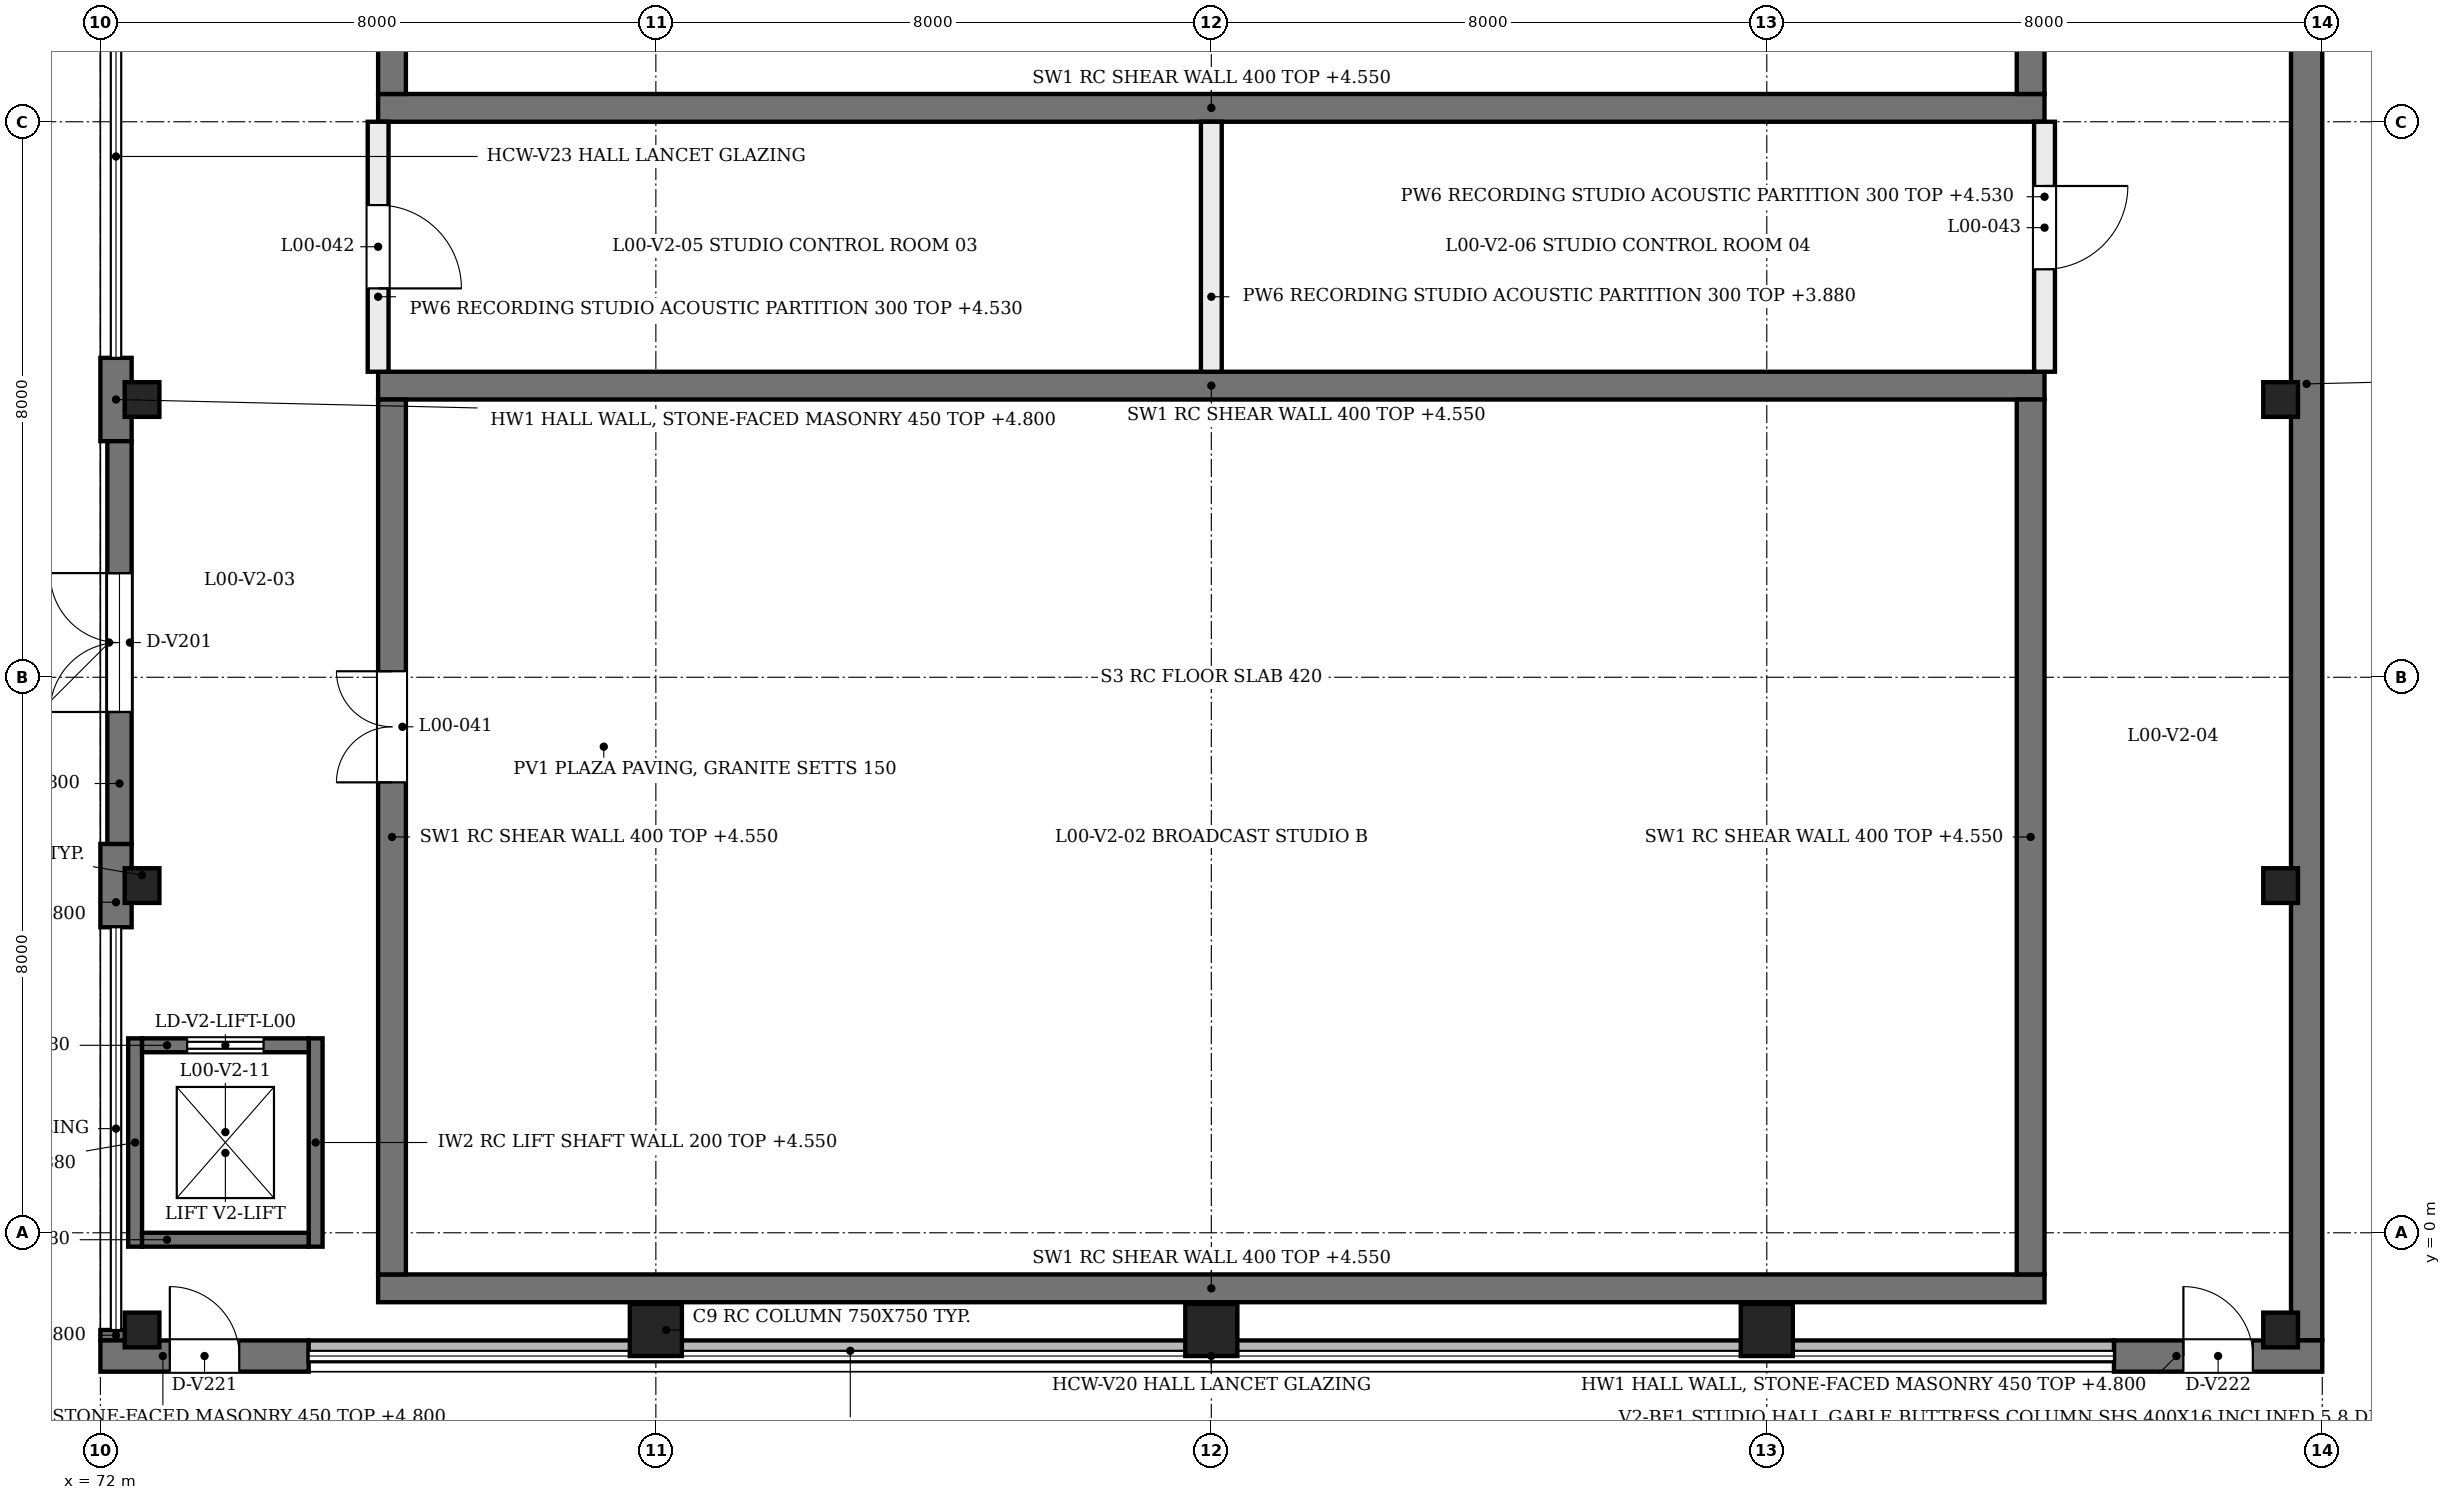
"""IFC4 building model, lengths in metres.
Left out: names, types, materials, properties, quantities, classifications, styles, units other than length and angle.
Written with IfcOpenShell. Run it as: python <this file> out.ifc"""

import sys

from ifc_helpers import new_model, si_unit, direction, frame, frame_2d, origin, origin_2d, place, context, subcontext, project, spatial, rectangle, extrude, element, fill, save


model = new_model("IFC4")
c1 = context("Model", 3, precision=1e-05, world=origin(), true_north=direction((0.0, 1.0)))
c2 = subcontext(c1, "Body", "Model", "MODEL_VIEW")
j1 = project(units=[si_unit("LENGTHUNIT", "METRE"), si_unit("PLANEANGLEUNIT", "RADIAN")], contexts=[c1])
p1 = place(None, origin())
s1 = spatial("IfcSite", under=j1, at=p1, CompositionType="ELEMENT")
p2 = place(p1, origin())
s2 = spatial("IfcBuilding", under=s1, at=p2, CompositionType="ELEMENT")
p3 = place(p2, origin())
s3 = spatial("IfcBuildingStorey", under=s2, at=p3, CompositionType="ELEMENT", Elevation=0.0)
p4 = place(p3, frame((76.0, 16.2, 0.0), z_axis=(0.0, 0.0, 1.0), x_axis=(1.0, 0.0, 0.0)))
e1 = element("IfcWall", 1, at=p4, inside=s3, PredefinedType="SHEAR", context=c2, shape_type="SweptSolid", body=[
    extrude(rectangle(XDim=24.0, YDim=0.4, at=frame_2d((12.0, 0.0))), origin(), (0.0, 0.0, 1.0), 4.55),
])
p5 = place(p3, frame((76.2, 16.4, 0.0), z_axis=(0.0, 0.0, 1.0), x_axis=(0.0, 1.0, 0.0)))
e2 = element("IfcWall", 2, at=p5, inside=s3, PredefinedType="SHEAR", context=c2, shape_type="SweptSolid", body=[
    extrude(rectangle(XDim=22.6, YDim=0.4, at=frame_2d((11.3, 0.0))), origin(), (0.0, 0.0, 1.0), 4.55),
])
p6 = place(p3, frame((99.8, 16.4, 0.0), z_axis=(0.0, 0.0, 1.0), x_axis=(0.0, 1.0, 0.0)))
e3 = element("IfcWall", 3, at=p6, inside=s3, PredefinedType="SHEAR", context=c2, shape_type="SweptSolid", body=[
    extrude(rectangle(XDim=22.6, YDim=0.4, at=frame_2d((11.3, 0.0))), origin(), (0.0, 0.0, 1.0), 4.55),
])
p7 = place(p6, frame((7.413, 0.0, 0.0)))
e4 = element("IfcOpeningElement", 4, at=p7, cuts=e3, PredefinedType="OPENING", context=c2, shape_type="SweptSolid", body=[
    extrude(rectangle(XDim=1.8, YDim=2.4, at=frame_2d((0.9, 1.2))), frame((0.0, 0.21, 0.0), z_axis=(0.0, -1.0, 0.0), x_axis=(1.0, 0.0, 0.0)), (0.0, 0.0, 1.0), 0.42),
])
for number, where, z_axis, x_axis in (
    (5, (76.0, -0.8, 0.0), (0.0, 0.0, 1.0), (1.0, 0.0, 0.0)),
    (6, (76.0, 12.2, 0.0), (0.0, 0.0, 1.0), (1.0, 0.0, 0.0)),
):
    element("IfcWall", number, at=place(p3, frame(where, z_axis=z_axis, x_axis=x_axis)), inside=s3, PredefinedType="SHEAR", context=c2, shape_type="SweptSolid", body=[
        extrude(rectangle(XDim=24.0, YDim=0.4, at=frame_2d((12.0, 0.0))), origin(), (0.0, 0.0, 1.0), 4.55),
    ])
p8 = place(p3, frame((76.2, -0.6, 0.0), z_axis=(0.0, 0.0, 1.0), x_axis=(0.0, 1.0, 0.0)))
e7 = element("IfcWall", 7, at=p8, inside=s3, PredefinedType="SHEAR", context=c2, shape_type="SweptSolid", body=[
    extrude(rectangle(XDim=12.6, YDim=0.4, at=frame_2d((6.3, 0.0))), origin(), (0.0, 0.0, 1.0), 4.55),
])
p9 = place(p8, frame((7.087, 0.0, 0.0)))
e8 = element("IfcOpeningElement", 8, at=p9, cuts=e7, PredefinedType="OPENING", context=c2, shape_type="SweptSolid", body=[
    extrude(rectangle(XDim=1.6, YDim=2.4, at=frame_2d((0.8, 1.2))), frame((0.0, 0.21, 0.0), z_axis=(0.0, -1.0, 0.0), x_axis=(1.0, 0.0, 0.0)), (0.0, 0.0, 1.0), 0.42),
])
p10 = place(p3, frame((99.8, -0.6, 0.0), z_axis=(0.0, 0.0, 1.0), x_axis=(0.0, 1.0, 0.0)))
e9 = element("IfcWall", 9, at=p10, inside=s3, PredefinedType="SHEAR", context=c2, shape_type="SweptSolid", body=[
    extrude(rectangle(XDim=12.6, YDim=0.4, at=frame_2d((6.3, 0.0))), origin(), (0.0, 0.0, 1.0), 4.55),
])
for number, where, z_axis, x_axis in (
    (10, (72.6, -1.4, 0.0), (0.0, 0.0, 1.0), (1.0, 0.0, 0.0)),
    (11, (72.6, 5.0, 0.0), (0.0, 0.0, 1.0), (1.0, 0.0, 0.0)),
    (12, (72.6, 12.0, 0.0), (0.0, 0.0, 1.0), (1.0, 0.0, 0.0)),
):
    element("IfcColumn", number, at=place(p3, frame(where, z_axis=z_axis, x_axis=x_axis)), inside=s3, PredefinedType="COLUMN", context=c2, shape_type="SweptSolid", body=[
        extrude(rectangle(XDim=0.5, YDim=0.5, at=origin_2d()), origin(), (0.0, 0.0, 1.0), 4.8),
    ])
for number, where, z_axis, x_axis in (
    (13, (80.0, -1.4, 0.0), (0.0, 0.0, 1.0), (1.0, 0.0, 0.0)),
    (14, (88.0, -1.4, 0.0), (0.0, 0.0, 1.0), (1.0, 0.0, 0.0)),
    (15, (96.0, -1.4, 0.0), (0.0, 0.0, 1.0), (1.0, 0.0, 0.0)),
):
    element("IfcColumn", number, at=place(p3, frame(where, z_axis=z_axis, x_axis=x_axis)), inside=s3, PredefinedType="COLUMN", context=c2, shape_type="SweptSolid", body=[
        extrude(rectangle(XDim=0.75, YDim=0.75, at=origin_2d()), origin(), (0.0, 0.0, 1.0), 4.8),
    ])
for number, where, z_axis, x_axis in (
    (16, (103.4, -1.4, 0.0), (0.0, 0.0, 1.0), (1.0, 0.0, 0.0)),
    (17, (103.4, 5.0, 0.0), (0.0, 0.0, 1.0), (1.0, 0.0, 0.0)),
    (18, (103.4, 12.0, 0.0), (0.0, 0.0, 1.0), (1.0, 0.0, 0.0)),
):
    element("IfcColumn", number, at=place(p3, frame(where, z_axis=z_axis, x_axis=x_axis)), inside=s3, PredefinedType="COLUMN", context=c2, shape_type="SweptSolid", body=[
        extrude(rectangle(XDim=0.5, YDim=0.5, at=origin_2d()), origin(), (0.0, 0.0, 1.0), 4.8),
    ])
p11 = place(p3, frame((72.225, -1.55, 0.0), z_axis=(0.0, 0.0, 1.0), x_axis=(0.0, 1.0, 0.0)))
e19 = element("IfcWall", 19, at=p11, inside=s3, PredefinedType="SOLIDWALL", context=c2, shape_type="SweptSolid", body=[
    extrude(rectangle(XDim=0.15, YDim=0.45, at=frame_2d((0.075, 0.0))), origin(), (0.0, 0.0, 1.0), 4.8),
])
for number, where, z_axis, x_axis in (
    (20, (72.225, 4.4, 0.0), (0.0, 0.0, 1.0), (0.0, 1.0, 0.0)),
    (21, (72.225, 11.4, 0.0), (0.0, 0.0, 1.0), (0.0, 1.0, 0.0)),
):
    element("IfcWall", number, at=place(p3, frame(where, z_axis=z_axis, x_axis=x_axis)), inside=s3, PredefinedType="SOLIDWALL", context=c2, shape_type="SweptSolid", body=[
        extrude(rectangle(XDim=1.2, YDim=0.45, at=frame_2d((0.6, 0.0))), origin(), (0.0, 0.0, 1.0), 4.8),
    ])
p12 = place(p3, frame((72.275, 5.6, 0.0), z_axis=(0.0, 0.0, 1.0), x_axis=(0.0, 1.0, 0.0)))
e22 = element("IfcWall", 22, at=p12, inside=s3, PredefinedType="SOLIDWALL", context=c2, shape_type="SweptSolid", body=[
    extrude(rectangle(XDim=5.8, YDim=0.35, at=frame_2d((2.9, 0.0))), origin(), (0.0, 0.0, 1.0), 4.8),
])
p13 = place(p12, frame((1.9, 0.0, 0.0)))
e23 = element("IfcOpeningElement", 23, at=p13, cuts=e22, PredefinedType="OPENING", context=c2, shape_type="SweptSolid", body=[
    extrude(rectangle(XDim=2.0, YDim=2.7, at=frame_2d((1.0, 1.35))), frame((0.0, 0.185, 0.0), z_axis=(0.0, -1.0, 0.0), x_axis=(1.0, 0.0, 0.0)), (0.0, 0.0, 1.0), 0.37),
])
p14 = place(p12, frame((1.9, 0.0, 3.0)))
e24 = element("IfcOpeningElement", 24, at=p14, cuts=e22, PredefinedType="OPENING", context=c2, shape_type="SweptSolid", body=[
    extrude(rectangle(XDim=2.0, YDim=1.5, at=frame_2d((1.0, 0.75))), frame((0.0, 0.185, 0.0), z_axis=(0.0, -1.0, 0.0), x_axis=(1.0, 0.0, 0.0)), (0.0, 0.0, 1.0), 0.37),
])
p15 = place(p3, frame((103.775, -1.55, 0.0), z_axis=(0.0, 0.0, 1.0), x_axis=(0.0, 1.0, 0.0)))
e25 = element("IfcWall", 25, at=p15, inside=s3, PredefinedType="SOLIDWALL", context=c2, shape_type="SweptSolid", body=[
    extrude(rectangle(XDim=41.1, YDim=0.45, at=frame_2d((20.55, 0.0))), origin(), (0.0, 0.0, 1.0), 4.8),
])
p16 = place(p15, frame((35.1, 0.0, 0.0)))
e26 = element("IfcOpeningElement", 26, at=p16, cuts=e25, PredefinedType="OPENING", context=c2, shape_type="SweptSolid", body=[
    extrude(rectangle(XDim=1.0, YDim=2.1, at=frame_2d((0.5, 1.05))), frame((0.0, 0.235, 0.0), z_axis=(0.0, -1.0, 0.0), x_axis=(1.0, 0.0, 0.0)), (0.0, 0.0, 1.0), 0.47),
])
p17 = place(p3, frame((72.0, -1.775, 0.0), z_axis=(0.0, 0.0, 1.0), x_axis=(1.0, 0.0, 0.0)))
e27 = element("IfcWall", 27, at=p17, inside=s3, PredefinedType="SOLIDWALL", context=c2, shape_type="SweptSolid", body=[
    extrude(rectangle(XDim=3.0, YDim=0.45, at=frame_2d((1.5, 0.0))), origin(), (0.0, 0.0, 1.0), 4.8),
])
p18 = place(p17, frame((1.0, 0.0, 0.0)))
e28 = element("IfcOpeningElement", 28, at=p18, cuts=e27, PredefinedType="OPENING", context=c2, shape_type="SweptSolid", body=[
    extrude(rectangle(XDim=1.0, YDim=2.4, at=frame_2d((0.5, 1.2))), frame((0.0, 0.235, 0.0), z_axis=(0.0, -1.0, 0.0), x_axis=(1.0, 0.0, 0.0)), (0.0, 0.0, 1.0), 0.47),
])
p19 = place(p3, frame((101.0, -1.775, 0.0), z_axis=(0.0, 0.0, 1.0), x_axis=(1.0, 0.0, 0.0)))
e29 = element("IfcWall", 29, at=p19, inside=s3, PredefinedType="SOLIDWALL", context=c2, shape_type="SweptSolid", body=[
    extrude(rectangle(XDim=3.0, YDim=0.45, at=frame_2d((1.5, 0.0))), origin(), (0.0, 0.0, 1.0), 4.8),
])
p20 = place(p19, frame((1.0, 0.0, 0.0)))
e30 = element("IfcOpeningElement", 30, at=p20, cuts=e29, PredefinedType="OPENING", context=c2, shape_type="SweptSolid", body=[
    extrude(rectangle(XDim=1.0, YDim=2.4, at=frame_2d((0.5, 1.2))), frame((0.0, 0.235, 0.0), z_axis=(0.0, -1.0, 0.0), x_axis=(1.0, 0.0, 0.0)), (0.0, 0.0, 1.0), 0.47),
])
p21 = place(p3, frame((75.0, -1.7, 0.0), z_axis=(0.0, 0.0, 1.0), x_axis=(1.0, 0.0, 0.0)))
e31 = element("IfcWall", 31, at=p21, inside=s3, PredefinedType="SOLIDWALL", context=c2, shape_type="SweptSolid", body=[
    extrude(rectangle(XDim=26.0, YDim=0.3, at=frame_2d((13.0, 0.0))), origin(), (0.0, 0.0, 1.0), 1.2),
])
p22 = place(p3, frame((72.5, -0.2, 0.0), z_axis=(0.0, 0.0, 1.0), x_axis=(0.0, 1.0, 0.0)))
e32 = element("IfcWall", 32, at=p22, inside=s3, PredefinedType="SOLIDWALL", context=c2, shape_type="SweptSolid", body=[
    extrude(rectangle(XDim=3.0, YDim=0.2, at=frame_2d((1.5, 0.0))), origin(), (0.0, 0.0, 1.0), 3.88),
])
p23 = place(p3, frame((75.1, -0.2, 0.0), z_axis=(0.0, 0.0, 1.0), x_axis=(0.0, 1.0, 0.0)))
e33 = element("IfcWall", 33, at=p23, inside=s3, PredefinedType="SOLIDWALL", context=c2, shape_type="SweptSolid", body=[
    extrude(rectangle(XDim=3.0, YDim=0.2, at=frame_2d((1.5, 0.0))), origin(), (0.0, 0.0, 1.0), 4.55),
])
p24 = place(p3, frame((72.6, -0.1, 0.0), z_axis=(0.0, 0.0, 1.0), x_axis=(1.0, 0.0, 0.0)))
e34 = element("IfcWall", 34, at=p24, inside=s3, PredefinedType="SOLIDWALL", context=c2, shape_type="SweptSolid", body=[
    extrude(rectangle(XDim=2.4, YDim=0.2, at=frame_2d((1.2, 0.0))), origin(), (0.0, 0.0, 1.0), 3.88),
])
p25 = place(p3, frame((72.6, 2.7, 0.0), z_axis=(0.0, 0.0, 1.0), x_axis=(1.0, 0.0, 0.0)))
e35 = element("IfcWall", 35, at=p25, inside=s3, PredefinedType="SOLIDWALL", context=c2, shape_type="SweptSolid", body=[
    extrude(rectangle(XDim=2.4, YDim=0.2, at=frame_2d((1.2, 0.0))), origin(), (0.0, 0.0, 1.0), 3.88),
])
p26 = place(p25, frame((0.65, 0.0, 0.0)))
e36 = element("IfcOpeningElement", 36, at=p26, cuts=e35, PredefinedType="OPENING", context=c2, shape_type="SweptSolid", body=[
    extrude(rectangle(XDim=1.1, YDim=2.1, at=frame_2d((0.55, 1.05))), frame((0.0, 0.11, 0.0), z_axis=(0.0, -1.0, 0.0), x_axis=(1.0, 0.0, 0.0)), (0.0, 0.0, 1.0), 0.22),
])
p27 = place(p3, frame((76.0, 12.4, 0.0), z_axis=(0.0, 0.0, 1.0), x_axis=(0.0, 1.0, 0.0)))
e37 = element("IfcWall", 37, at=p27, inside=s3, PredefinedType="PARTITIONING", context=c2, shape_type="SweptSolid", body=[
    extrude(rectangle(XDim=3.6, YDim=0.3, at=frame_2d((1.8, 0.0))), origin(), (0.0, 0.0, 1.0), 4.53),
])
p28 = place(p27, frame((1.2, 0.0, 0.0)))
e38 = element("IfcOpeningElement", 38, at=p28, cuts=e37, PredefinedType="OPENING", context=c2, shape_type="SweptSolid", body=[
    extrude(rectangle(XDim=1.2, YDim=2.2, at=frame_2d((0.6, 1.1))), frame((0.0, 0.16, 0.0), z_axis=(0.0, -1.0, 0.0), x_axis=(1.0, 0.0, 0.0)), (0.0, 0.0, 1.0), 0.32),
])
p29 = place(p3, frame((100.0, 12.4, 0.0), z_axis=(0.0, 0.0, 1.0), x_axis=(0.0, 1.0, 0.0)))
e39 = element("IfcWall", 39, at=p29, inside=s3, PredefinedType="PARTITIONING", context=c2, shape_type="SweptSolid", body=[
    extrude(rectangle(XDim=3.6, YDim=0.3, at=frame_2d((1.8, 0.0))), origin(), (0.0, 0.0, 1.0), 4.53),
])
p30 = place(p29, frame((1.475, 0.0, 0.0)))
e40 = element("IfcOpeningElement", 40, at=p30, cuts=e39, PredefinedType="OPENING", context=c2, shape_type="SweptSolid", body=[
    extrude(rectangle(XDim=1.2, YDim=2.2, at=frame_2d((0.6, 1.1))), frame((0.0, 0.16, 0.0), z_axis=(0.0, -1.0, 0.0), x_axis=(1.0, 0.0, 0.0)), (0.0, 0.0, 1.0), 0.32),
])
p31 = place(p3, frame((88.0, 12.4, 0.0), z_axis=(0.0, 0.0, 1.0), x_axis=(0.0, 1.0, 0.0)))
e41 = element("IfcWall", 41, at=p31, inside=s3, PredefinedType="PARTITIONING", context=c2, shape_type="SweptSolid", body=[
    extrude(rectangle(XDim=3.6, YDim=0.3, at=frame_2d((1.8, 0.0))), origin(), (0.0, 0.0, 1.0), 3.88),
])
p32 = place(p13, origin())
e42 = element("IfcDoor", 42, at=p32, inside=s3, OperationType="SINGLE_SWING_LEFT", PredefinedType="DOOR", context=c2, shape_type="SweptSolid", body=[
    extrude(rectangle(XDim=2.0, YDim=2.7, at=frame_2d((1.0, 1.35))), frame((0.0, 0.025, 0.0), z_axis=(0.0, -1.0, 0.0), x_axis=(1.0, 0.0, 0.0)), (0.0, 0.0, 1.0), 0.05),
])
fill(e23, e42)
p33 = place(p14, origin())
e43 = element("IfcWindow", 43, at=p33, inside=s3, PartitioningType="SINGLE_PANEL", PredefinedType="WINDOW", context=c2, shape_type="SweptSolid", body=[
    extrude(rectangle(XDim=2.0, YDim=1.5, at=frame_2d((1.0, 0.75))), frame((0.0, 0.03, 0.0), z_axis=(0.0, -1.0, 0.0), x_axis=(1.0, 0.0, 0.0)), (0.0, 0.0, 1.0), 0.06),
])
fill(e24, e43)
p34 = place(p18, origin())
e44 = element("IfcDoor", 44, at=p34, inside=s3, OperationType="SINGLE_SWING_LEFT", PredefinedType="DOOR", context=c2, shape_type="SweptSolid", body=[
    extrude(rectangle(XDim=1.0, YDim=2.4, at=frame_2d((0.5, 1.2))), frame((0.0, 0.025, 0.0), z_axis=(0.0, -1.0, 0.0), x_axis=(1.0, 0.0, 0.0)), (0.0, 0.0, 1.0), 0.05),
])
fill(e28, e44)
p35 = place(p20, origin())
e45 = element("IfcDoor", 45, at=p35, inside=s3, OperationType="SINGLE_SWING_LEFT", PredefinedType="DOOR", context=c2, shape_type="SweptSolid", body=[
    extrude(rectangle(XDim=1.0, YDim=2.4, at=frame_2d((0.5, 1.2))), frame((0.0, 0.025, 0.0), z_axis=(0.0, -1.0, 0.0), x_axis=(1.0, 0.0, 0.0)), (0.0, 0.0, 1.0), 0.05),
])
fill(e30, e45)
p36 = place(p26, origin())
e46 = element("IfcDoor", 46, at=p36, inside=s3, OperationType="DOUBLE_DOOR_SLIDING", PredefinedType="DOOR", context=c2, shape_type="SweptSolid", body=[
    extrude(rectangle(XDim=1.1, YDim=2.1, at=frame_2d((0.55, 1.05))), frame((0.0, 0.025, 0.0), z_axis=(0.0, -1.0, 0.0), x_axis=(1.0, 0.0, 0.0)), (0.0, 0.0, 1.0), 0.05),
])
fill(e36, e46)
p37 = place(p9, origin())
e47 = element("IfcDoor", 47, at=p37, inside=s3, OperationType="DOUBLE_DOOR_SINGLE_SWING", PredefinedType="DOOR", context=c2, shape_type="SweptSolid", body=[
    extrude(rectangle(XDim=1.6, YDim=2.4, at=frame_2d((0.8, 1.2))), frame((0.0, 0.025, 0.0), z_axis=(0.0, -1.0, 0.0), x_axis=(1.0, 0.0, 0.0)), (0.0, 0.0, 1.0), 0.05),
])
fill(e8, e47)
p38 = place(p28, frame((1.2, 0.0, 0.0), z_axis=(0.0, 0.0, 1.0), x_axis=(-1.0, 0.0, 0.0)))
e48 = element("IfcDoor", 48, at=p38, inside=s3, OperationType="SINGLE_SWING_LEFT", PredefinedType="DOOR", context=c2, shape_type="SweptSolid", body=[
    extrude(rectangle(XDim=1.2, YDim=2.2, at=frame_2d((0.6, 1.1))), frame((0.0, 0.025, 0.0), z_axis=(0.0, -1.0, 0.0), x_axis=(1.0, 0.0, 0.0)), (0.0, 0.0, 1.0), 0.05),
])
fill(e38, e48)
p39 = place(p30, origin())
e49 = element("IfcDoor", 49, at=p39, inside=s3, OperationType="SINGLE_SWING_RIGHT", PredefinedType="DOOR", context=c2, shape_type="SweptSolid", body=[
    extrude(rectangle(XDim=1.2, YDim=2.2, at=frame_2d((0.6, 1.1))), frame((0.0, 0.025, 0.0), z_axis=(0.0, -1.0, 0.0), x_axis=(1.0, 0.0, 0.0)), (0.0, 0.0, 1.0), 0.05),
])
fill(e40, e49)
save(model, sys.argv[1])
